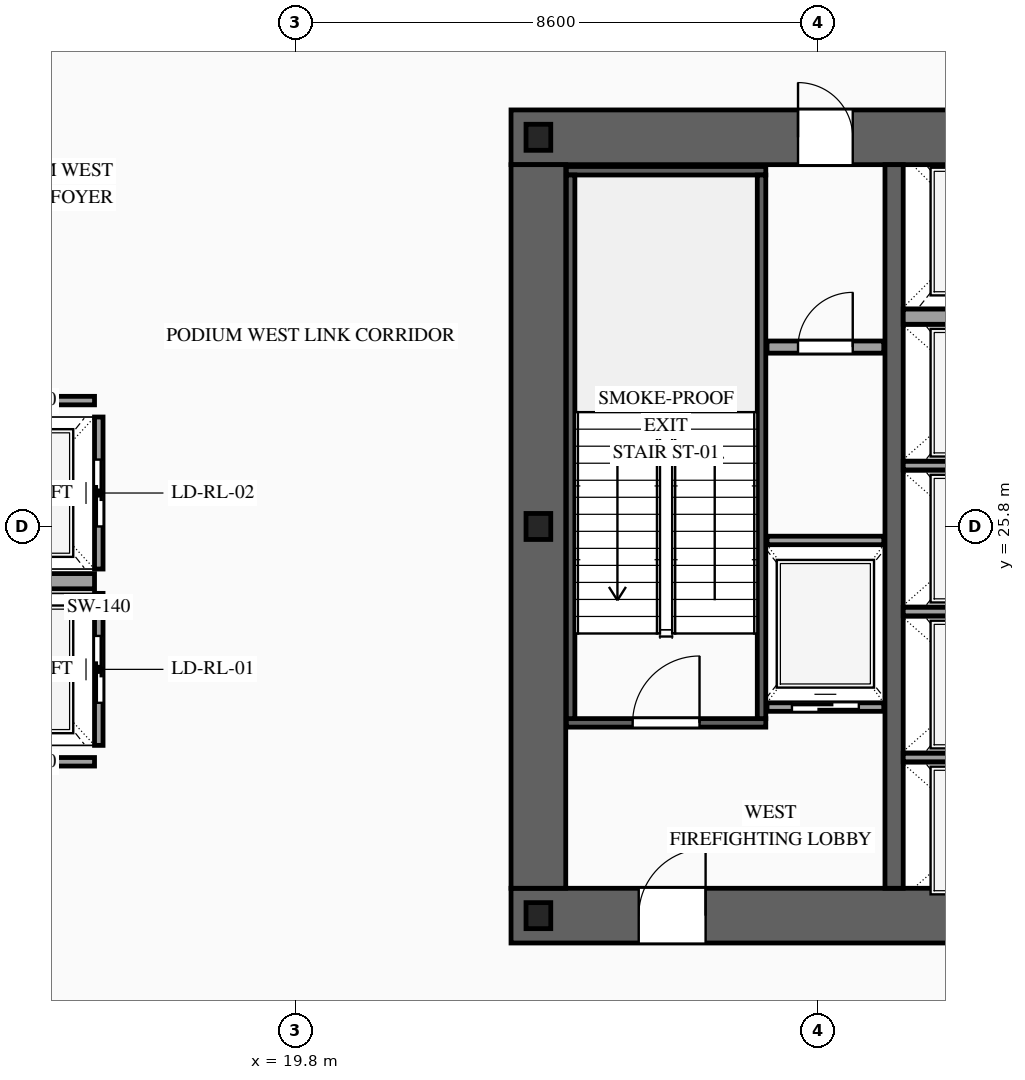
"""IFC4 building model, lengths in metres.
Left out: names, types, materials, properties, quantities, classifications, styles, units other than length and angle.
Written with IfcOpenShell. Run it as: python <this file> out.ifc"""

import sys

from ifc_helpers import new_model, si_unit, direction, frame, frame_2d, origin, origin_2d, place, context, subcontext, project, spatial, rectangle, i_section, extrude, source, transform, mapped, element, fill, save


model = new_model("IFC4")
c1 = context("Model", 3, precision=1e-05, world=origin(), true_north=direction((0.0, 1.0)))
c2 = subcontext(c1, "Body", "Model", "MODEL_VIEW")
j1 = project(units=[si_unit("LENGTHUNIT", "METRE"), si_unit("PLANEANGLEUNIT", "RADIAN")], contexts=[c1])
p1 = place(None, origin())
s1 = spatial("IfcSite", under=j1, at=p1, CompositionType="ELEMENT")
p2 = place(p1, origin())
s2 = spatial("IfcBuilding", under=s1, at=p2, CompositionType="ELEMENT")
p3 = place(p2, frame((0.0, 0.0, 25.8)))
s3 = spatial("IfcBuildingStorey", under=s2, at=p3, CompositionType="ELEMENT", Elevation=25.8)
p4 = place(p3, frame((23.35, 19.4, 0.0), z_axis=(0.0, 0.0, 1.0), x_axis=(1.0, 0.0, 0.0)))
e1 = element("IfcWall", 1, at=p4, inside=s3, PredefinedType="SHEAR", context=c2, shape_type="SweptSolid", body=[
    extrude(rectangle(XDim=27.3, YDim=0.9, at=frame_2d((13.65, 0.0))), origin(), (0.0, 0.0, 1.0), 4.8),
])
p5 = place(p4, frame((2.1, 0.0, 0.0)))
e2 = element("IfcOpeningElement", 2, at=p5, cuts=e1, PredefinedType="OPENING", context=c2, shape_type="SweptSolid", body=[
    extrude(rectangle(XDim=1.1, YDim=2.2, at=frame_2d((0.55, 1.1))), frame((0.0, 0.465, 0.0), z_axis=(0.0, -1.0, 0.0), x_axis=(1.0, 0.0, 0.0)), (0.0, 0.0, 1.0), 0.93),
])
p6 = place(p4, frame((10.0, 0.0, 0.0)))
e3 = element("IfcOpeningElement", 3, at=p6, cuts=e1, PredefinedType="OPENING", context=c2, shape_type="SweptSolid", body=[
    extrude(rectangle(XDim=1.1, YDim=2.2, at=frame_2d((0.55, 1.1))), frame((0.0, 0.465, 0.0), z_axis=(0.0, -1.0, 0.0), x_axis=(1.0, 0.0, 0.0)), (0.0, 0.0, 1.0), 0.93),
])
p7 = place(p4, frame((23.2, 0.0, 0.0)))
e4 = element("IfcOpeningElement", 4, at=p7, cuts=e1, PredefinedType="OPENING", context=c2, shape_type="SweptSolid", body=[
    extrude(rectangle(XDim=1.1, YDim=2.2, at=frame_2d((0.55, 1.1))), frame((0.0, 0.465, 0.0), z_axis=(0.0, -1.0, 0.0), x_axis=(1.0, 0.0, 0.0)), (0.0, 0.0, 1.0), 0.93),
])
p8 = place(p4, frame((19.82, 0.0, 0.0)))
e5 = element("IfcOpeningElement", 5, at=p8, cuts=e1, PredefinedType="OPENING", context=c2, shape_type="SweptSolid", body=[
    extrude(rectangle(XDim=0.9, YDim=2.15, at=frame_2d((0.45, 1.075))), frame((0.0, 0.465, 0.0), z_axis=(0.0, -1.0, 0.0), x_axis=(1.0, 0.0, 0.0)), (0.0, 0.0, 1.0), 0.93),
])
p9 = place(p4, frame((18.38, 0.0, 0.0)))
e6 = element("IfcOpeningElement", 6, at=p9, cuts=e1, PredefinedType="OPENING", context=c2, shape_type="SweptSolid", body=[
    extrude(rectangle(XDim=0.9, YDim=2.15, at=frame_2d((0.45, 1.075))), frame((0.0, 0.465, 0.0), z_axis=(0.0, -1.0, 0.0), x_axis=(1.0, 0.0, 0.0)), (0.0, 0.0, 1.0), 0.93),
])
p10 = place(p3, frame((23.35, 32.2, 0.0), z_axis=(0.0, 0.0, 1.0), x_axis=(1.0, 0.0, 0.0)))
e7 = element("IfcWall", 7, at=p10, inside=s3, PredefinedType="SHEAR", context=c2, shape_type="SweptSolid", body=[
    extrude(rectangle(XDim=27.3, YDim=0.9, at=frame_2d((13.65, 0.0))), origin(), (0.0, 0.0, 1.0), 4.8),
])
p11 = place(p10, frame((4.72, 0.0, 0.0)))
e8 = element("IfcOpeningElement", 8, at=p11, cuts=e7, PredefinedType="OPENING", context=c2, shape_type="SweptSolid", body=[
    extrude(rectangle(XDim=0.9, YDim=2.15, at=frame_2d((0.45, 1.075))), frame((0.0, 0.465, 0.0), z_axis=(0.0, -1.0, 0.0), x_axis=(1.0, 0.0, 0.0)), (0.0, 0.0, 1.0), 0.93),
])
p12 = place(p10, frame((10.0, 0.0, 0.0)))
e9 = element("IfcOpeningElement", 9, at=p12, cuts=e7, PredefinedType="OPENING", context=c2, shape_type="SweptSolid", body=[
    extrude(rectangle(XDim=1.1, YDim=2.2, at=frame_2d((0.55, 1.1))), frame((0.0, 0.465, 0.0), z_axis=(0.0, -1.0, 0.0), x_axis=(1.0, 0.0, 0.0)), (0.0, 0.0, 1.0), 0.93),
])
p13 = place(p10, frame((15.85, 0.0, 0.0)))
e10 = element("IfcOpeningElement", 10, at=p13, cuts=e7, PredefinedType="OPENING", context=c2, shape_type="SweptSolid", body=[
    extrude(rectangle(XDim=1.1, YDim=2.2, at=frame_2d((0.55, 1.1))), frame((0.0, 0.465, 0.0), z_axis=(0.0, -1.0, 0.0), x_axis=(1.0, 0.0, 0.0)), (0.0, 0.0, 1.0), 0.93),
])
p14 = place(p10, frame((18.38, 0.0, 0.0)))
e11 = element("IfcOpeningElement", 11, at=p14, cuts=e7, PredefinedType="OPENING", context=c2, shape_type="SweptSolid", body=[
    extrude(rectangle(XDim=0.9, YDim=2.15, at=frame_2d((0.45, 1.075))), frame((0.0, 0.465, 0.0), z_axis=(0.0, -1.0, 0.0), x_axis=(1.0, 0.0, 0.0)), (0.0, 0.0, 1.0), 0.93),
])
p15 = place(p10, frame((19.82, 0.0, 0.0)))
e12 = element("IfcOpeningElement", 12, at=p15, cuts=e7, PredefinedType="OPENING", context=c2, shape_type="SweptSolid", body=[
    extrude(rectangle(XDim=0.9, YDim=2.15, at=frame_2d((0.45, 1.075))), frame((0.0, 0.465, 0.0), z_axis=(0.0, -1.0, 0.0), x_axis=(1.0, 0.0, 0.0)), (0.0, 0.0, 1.0), 0.93),
])
m1 = source(origin(), c2, "Body", "SweptSolid", [
    extrude(rectangle(XDim=11.9, YDim=0.9, at=frame_2d((5.95, 0.0))), origin(), (0.0, 0.0, 1.0), 4.8),
])
p16 = place(p3, frame((23.8, 19.85, 0.0), z_axis=(0.0, 0.0, 1.0), x_axis=(0.0, 1.0, 0.0)))
e13 = element("IfcWall", 13, at=p16, inside=s3, PredefinedType="SHEAR", context=c2, shape_type="MappedRepresentation", body=[
    mapped(m1, transform((0.0, 0.0, 0.0), scale=1.0)),
])
m2 = source(origin(), c2, "Body", "SweptSolid", [
    extrude(rectangle(XDim=11.9, YDim=0.3, at=frame_2d((5.95, 0.0))), origin(), (0.0, 0.0, 1.0), 4.8),
])
p17 = place(p3, frame((29.65, 19.85, 0.0), z_axis=(0.0, 0.0, 1.0), x_axis=(0.0, 1.0, 0.0)))
e14 = element("IfcWall", 14, at=p17, inside=s3, PredefinedType="SOLIDWALL", context=c2, shape_type="MappedRepresentation", body=[
    mapped(m2, transform((0.0, 0.0, 0.0), scale=1.0)),
])
m3 = source(origin(), c2, "Body", "SweptSolid", [
    extrude(i_section(OverallWidth=0.407, OverallDepth=0.428, WebThickness=0.02, FlangeThickness=0.035, at=origin_2d()), origin(), (0.0, 0.0, 1.0), 4.8),
])
for number, where, z_axis, x_axis in (
    (15, (23.8, 19.4, 0.0), (0.0, 0.0, 1.0), (1.0, 0.0, 0.0)),
    (16, (23.8, 25.8, 0.0), (0.0, 0.0, 1.0), (1.0, 0.0, 0.0)),
    (17, (23.8, 32.2, 0.0), (0.0, 0.0, 1.0), (1.0, 0.0, 0.0)),
):
    element("IfcColumn", number, at=place(p3, frame(where, z_axis=z_axis, x_axis=x_axis)), inside=s3, PredefinedType="COLUMN", context=c2, shape_type="MappedRepresentation", body=[
        mapped(m3, transform((0.0, 0.0, 0.0), scale=1.0)),
    ])
p18 = place(p3, frame((27.56, 22.83, 0.0), z_axis=(0.0, 0.0, 1.0), x_axis=(1.0, 0.0, 0.0)))
e18 = element("IfcWall", 18, at=p18, inside=s3, PredefinedType="SOLIDWALL", context=c2, shape_type="SweptSolid", body=[
    extrude(rectangle(XDim=1.92, YDim=0.14, at=frame_2d((0.96, 0.0))), origin(), (0.0, 0.0, 1.0), 4.5),
])
p19 = place(p18, frame((0.41, 0.0, 0.0)))
e19 = element("IfcOpeningElement", 19, at=p19, cuts=e18, PredefinedType="OPENING", context=c2, shape_type="SweptSolid", body=[
    extrude(rectangle(XDim=1.1, YDim=2.2, at=frame_2d((0.55, 1.1))), frame((0.0, 0.085, 0.0), z_axis=(0.0, -1.0, 0.0), x_axis=(1.0, 0.0, 0.0)), (0.0, 0.0, 1.0), 0.17),
])
m4 = source(origin(), c2, "Body", "SweptSolid", [
    extrude(rectangle(XDim=1.92, YDim=0.14, at=frame_2d((0.96, 0.0))), origin(), (0.0, 0.0, 1.0), 4.5),
])
p20 = place(p3, frame((27.56, 25.57, 0.0), z_axis=(0.0, 0.0, 1.0), x_axis=(1.0, 0.0, 0.0)))
e20 = element("IfcWall", 20, at=p20, inside=s3, PredefinedType="SOLIDWALL", context=c2, shape_type="MappedRepresentation", body=[
    mapped(m4, transform((0.0, 0.0, 0.0), scale=1.0)),
])
m5 = source(origin(), c2, "Body", "SweptSolid", [
    extrude(rectangle(XDim=2.5, YDim=0.14, at=frame_2d((1.25, 0.0))), origin(), (0.0, 0.0, 1.0), 4.5),
])
for number, where, z_axis, x_axis in (
    (21, (29.8, 22.0, 0.0), (0.0, 0.0, 1.0), (1.0, 0.0, 0.0)),
    (22, (29.8, 24.4, 0.0), (0.0, 0.0, 1.0), (1.0, 0.0, 0.0)),
    (23, (29.8, 26.8, 0.0), (0.0, 0.0, 1.0), (1.0, 0.0, 0.0)),
):
    element("IfcWall", number, at=place(p3, frame(where, z_axis=z_axis, x_axis=x_axis)), inside=s3, PredefinedType="SOLIDWALL", context=c2, shape_type="MappedRepresentation", body=[
        mapped(m5, transform((0.0, 0.0, 0.0), scale=1.0)),
    ])
m6 = source(origin(), c2, "Body", "SweptSolid", [
    extrude(rectangle(XDim=2.5, YDim=0.25, at=frame_2d((1.25, 0.0))), origin(), (0.0, 0.0, 1.0), 4.5),
])
p21 = place(p3, frame((29.8, 29.25, 0.0), z_axis=(0.0, 0.0, 1.0), x_axis=(1.0, 0.0, 0.0)))
e24 = element("IfcWall", 24, at=p21, inside=s3, PredefinedType="SOLIDWALL", context=c2, shape_type="MappedRepresentation", body=[
    mapped(m6, transform((0.0, 0.0, 0.0), scale=1.0)),
])
p22 = place(p3, frame((16.57, 22.2, 0.0), z_axis=(0.0, 0.0, 1.0), x_axis=(0.0, 1.0, 0.0)))
e25 = element("IfcWall", 25, at=p22, inside=s3, PredefinedType="SOLIDWALL", context=c2, shape_type="SweptSolid", body=[
    extrude(rectangle(XDim=2.5, YDim=0.14, at=frame_2d((1.25, 0.0))), origin(), (0.0, 0.0, 1.0), 4.5),
])
p23 = place(p22, frame((0.7, 0.0, 0.0)))
e26 = element("IfcOpeningElement", 26, at=p23, cuts=e25, PredefinedType="OPENING", context=c2, shape_type="SweptSolid", body=[
    extrude(rectangle(XDim=1.1, YDim=2.2, at=frame_2d((0.55, 1.1))), frame((0.0, 0.085, 0.0), z_axis=(0.0, -1.0, 0.0), x_axis=(1.0, 0.0, 0.0)), (0.0, 0.0, 1.0), 0.17),
])
m7 = source(origin(), c2, "Body", "SweptSolid", [
    extrude(rectangle(XDim=2.3, YDim=0.25, at=frame_2d((1.15, 0.0))), origin(), (0.0, 0.0, 1.0), 4.5),
])
p24 = place(p3, frame((14.2, 24.9, 0.0), z_axis=(0.0, 0.0, 1.0), x_axis=(1.0, 0.0, 0.0)))
e27 = element("IfcWall", 27, at=p24, inside=s3, PredefinedType="SOLIDWALL", context=c2, shape_type="MappedRepresentation", body=[
    mapped(m7, transform((0.0, 0.0, 0.0), scale=1.0)),
])
m8 = source(origin(), c2, "Body", "SweptSolid", [
    extrude(rectangle(XDim=2.3, YDim=0.14, at=frame_2d((1.15, 0.0))), origin(), (0.0, 0.0, 1.0), 4.5),
])
p25 = place(p3, frame((14.2, 21.93, 0.0), z_axis=(0.0, 0.0, 1.0), x_axis=(1.0, 0.0, 0.0)))
e28 = element("IfcWall", 28, at=p25, inside=s3, PredefinedType="SOLIDWALL", context=c2, shape_type="MappedRepresentation", body=[
    mapped(m8, transform((0.0, 0.0, 0.0), scale=1.0)),
])
p26 = place(p3, frame((16.57, 25.1, 0.0), z_axis=(0.0, 0.0, 1.0), x_axis=(0.0, 1.0, 0.0)))
e29 = element("IfcWall", 29, at=p26, inside=s3, PredefinedType="SOLIDWALL", context=c2, shape_type="SweptSolid", body=[
    extrude(rectangle(XDim=2.5, YDim=0.14, at=frame_2d((1.25, 0.0))), origin(), (0.0, 0.0, 1.0), 4.5),
])
p27 = place(p26, frame((0.7, 0.0, 0.0)))
e30 = element("IfcOpeningElement", 30, at=p27, cuts=e29, PredefinedType="OPENING", context=c2, shape_type="SweptSolid", body=[
    extrude(rectangle(XDim=1.1, YDim=2.2, at=frame_2d((0.55, 1.1))), frame((0.0, 0.085, 0.0), z_axis=(0.0, -1.0, 0.0), x_axis=(1.0, 0.0, 0.0)), (0.0, 0.0, 1.0), 0.17),
])
p28 = place(p3, frame((14.2, 27.87, 0.0), z_axis=(0.0, 0.0, 1.0), x_axis=(1.0, 0.0, 0.0)))
e31 = element("IfcWall", 31, at=p28, inside=s3, PredefinedType="SOLIDWALL", context=c2, shape_type="MappedRepresentation", body=[
    mapped(m8, transform((0.0, 0.0, 0.0), scale=1.0)),
])
p29 = place(p3, frame((24.26, 22.57, 0.0), z_axis=(0.0, 0.0, 1.0), x_axis=(1.0, 0.0, 0.0)))
e32 = element("IfcWall", 32, at=p29, inside=s3, PredefinedType="SOLIDWALL", context=c2, shape_type="SweptSolid", body=[
    extrude(rectangle(XDim=3.28, YDim=0.14, at=frame_2d((1.64, 0.0))), origin(), (0.0, 0.0, 1.0), 4.5),
])
p30 = place(p29, frame((1.09, 0.0, 0.0)))
e33 = element("IfcOpeningElement", 33, at=p30, cuts=e32, PredefinedType="OPENING", context=c2, shape_type="SweptSolid", body=[
    extrude(rectangle(XDim=1.1, YDim=2.2, at=frame_2d((0.55, 1.1))), frame((0.0, 0.085, 0.0), z_axis=(0.0, -1.0, 0.0), x_axis=(1.0, 0.0, 0.0)), (0.0, 0.0, 1.0), 0.17),
])
m9 = source(origin(), c2, "Body", "SweptSolid", [
    extrude(rectangle(XDim=3.28, YDim=0.14, at=frame_2d((1.64, 0.0))), origin(), (0.0, 0.0, 1.0), 4.5),
])
p31 = place(p3, frame((24.26, 31.65, 0.0), z_axis=(0.0, 0.0, 1.0), x_axis=(1.0, 0.0, 0.0)))
e34 = element("IfcWall", 34, at=p31, inside=s3, PredefinedType="SOLIDWALL", context=c2, shape_type="MappedRepresentation", body=[
    mapped(m9, transform((0.0, 0.0, 0.0), scale=1.0)),
])
m10 = source(origin(), c2, "Body", "SweptSolid", [
    extrude(rectangle(XDim=8.94, YDim=0.14, at=frame_2d((4.47, 0.0))), origin(), (0.0, 0.0, 1.0), 4.5),
])
for number, where, z_axis, x_axis in (
    (35, (24.33, 22.64, 0.0), (0.0, 0.0, 1.0), (0.0, 1.0, 0.0)),
    (36, (27.47, 22.64, 0.0), (0.0, 0.0, 1.0), (0.0, 1.0, 0.0)),
):
    element("IfcWall", number, at=place(p3, frame(where, z_axis=z_axis, x_axis=x_axis)), inside=s3, PredefinedType="SOLIDWALL", context=c2, shape_type="MappedRepresentation", body=[
        mapped(m10, transform((0.0, 0.0, 0.0), scale=1.0)),
    ])
p32 = place(p3, frame((27.56, 28.75, 0.0), z_axis=(0.0, 0.0, 1.0), x_axis=(1.0, 0.0, 0.0)))
e37 = element("IfcWall", 37, at=p32, inside=s3, PredefinedType="PARTITIONING", context=c2, shape_type="SweptSolid", body=[
    extrude(rectangle(XDim=1.92, YDim=0.2, at=frame_2d((0.96, 0.0))), origin(), (0.0, 0.0, 1.0), 4.5),
])
p33 = place(p32, frame((0.51, 0.0, 0.0)))
e38 = element("IfcOpeningElement", 38, at=p33, cuts=e37, PredefinedType="OPENING", context=c2, shape_type="SweptSolid", body=[
    extrude(rectangle(XDim=0.9, YDim=2.15, at=frame_2d((0.45, 1.075))), frame((0.0, 0.115, 0.0), z_axis=(0.0, -1.0, 0.0), x_axis=(1.0, 0.0, 0.0)), (0.0, 0.0, 1.0), 0.23),
])
m11 = source(origin(), c2, "Body", "SweptSolid", [
    extrude(rectangle(XDim=1.1, YDim=2.2, at=frame_2d((0.55, 1.1))), frame((0.0, 0.025, 0.0), z_axis=(0.0, -1.0, 0.0), x_axis=(1.0, 0.0, 0.0)), (0.0, 0.0, 1.0), 0.05),
])
p34 = place(p19, origin())
e39 = element("IfcDoor", 39, at=p34, inside=s3, OperationType="SLIDING_TO_LEFT", PredefinedType="DOOR", context=c2, shape_type="MappedRepresentation", body=[
    mapped(m11, transform((0.0, 0.0, 0.0), scale=1.0)),
])
fill(e19, e39)
p35 = place(p23, origin())
e40 = element("IfcDoor", 40, at=p35, inside=s3, OperationType="SLIDING_TO_RIGHT", PredefinedType="DOOR", context=c2, shape_type="MappedRepresentation", body=[
    mapped(m11, transform((0.0, 0.0, 0.0), scale=1.0)),
])
fill(e26, e40)
p36 = place(p27, origin())
e41 = element("IfcDoor", 41, at=p36, inside=s3, OperationType="SLIDING_TO_LEFT", PredefinedType="DOOR", context=c2, shape_type="MappedRepresentation", body=[
    mapped(m11, transform((0.0, 0.0, 0.0), scale=1.0)),
])
fill(e30, e41)
m12 = source(origin(), c2, "Body", "SweptSolid", [
    extrude(rectangle(XDim=1.1, YDim=2.2, at=frame_2d((0.55, 1.1))), frame((0.0, 0.025, 0.0), z_axis=(0.0, -1.0, 0.0), x_axis=(1.0, 0.0, 0.0)), (0.0, 0.0, 1.0), 0.05),
])
p37 = place(p30, origin())
e42 = element("IfcDoor", 42, at=p37, inside=s3, OperationType="SINGLE_SWING_RIGHT", PredefinedType="DOOR", context=c2, shape_type="MappedRepresentation", body=[
    mapped(m12, transform((0.0, 0.0, 0.0), scale=1.0)),
])
fill(e33, e42)
p38 = place(p5, origin())
e43 = element("IfcDoor", 43, at=p38, inside=s3, OperationType="SINGLE_SWING_RIGHT", PredefinedType="DOOR", context=c2, shape_type="MappedRepresentation", body=[
    mapped(m12, transform((0.0, 0.0, 0.0), scale=1.0)),
])
fill(e2, e43)
m13 = source(origin(), c2, "Body", "SweptSolid", [
    extrude(rectangle(XDim=0.9, YDim=2.15, at=frame_2d((0.45, 1.075))), frame((0.0, 0.025, 0.0), z_axis=(0.0, -1.0, 0.0), x_axis=(1.0, 0.0, 0.0)), (0.0, 0.0, 1.0), 0.05),
])
p39 = place(p11, origin())
e44 = element("IfcDoor", 44, at=p39, inside=s3, OperationType="SINGLE_SWING_LEFT", PredefinedType="DOOR", context=c2, shape_type="MappedRepresentation", body=[
    mapped(m13, transform((0.0, 0.0, 0.0), scale=1.0)),
])
fill(e8, e44)
p40 = place(p33, origin())
e45 = element("IfcDoor", 45, at=p40, inside=s3, OperationType="SINGLE_SWING_RIGHT", PredefinedType="DOOR", context=c2, shape_type="MappedRepresentation", body=[
    mapped(m13, transform((0.0, 0.0, 0.0), scale=1.0)),
])
fill(e38, e45)
save(model, sys.argv[1])
